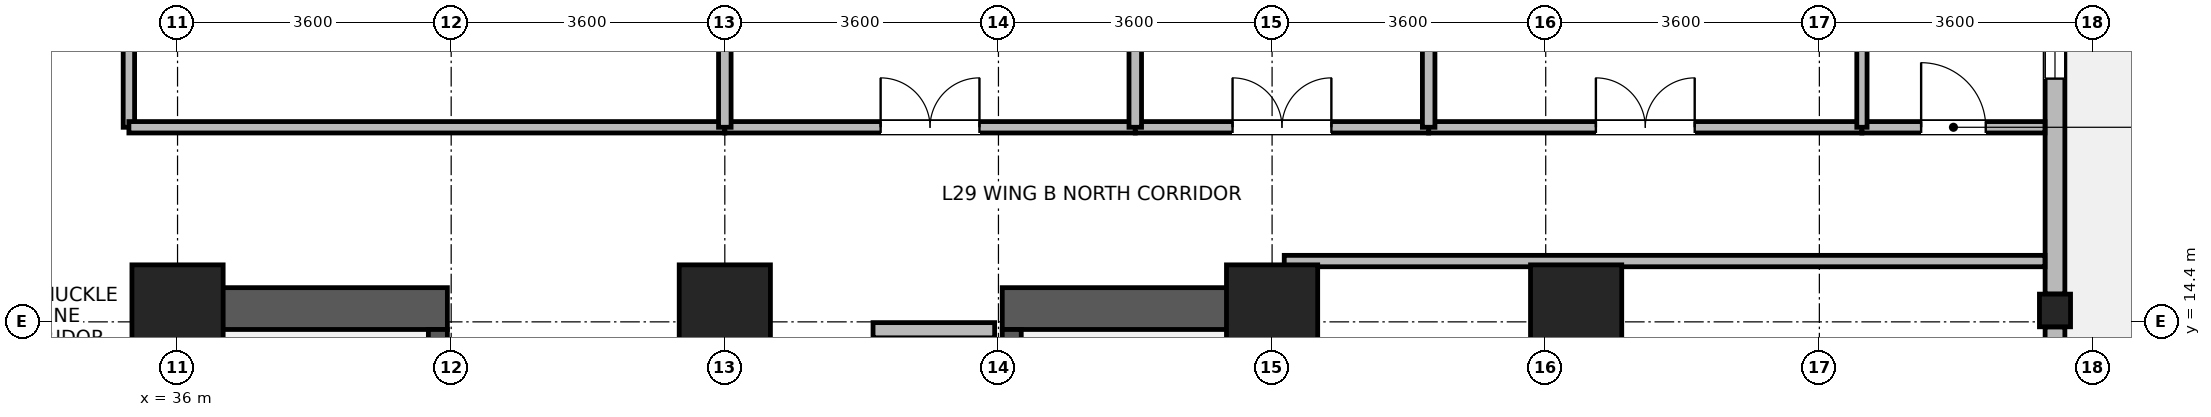
"""IFC4 building model, lengths in metres.
Left out: names, types, materials, properties, quantities, classifications, styles, units other than length and angle.
Written with IfcOpenShell. Run it as: python <this file> out.ifc"""

import sys

from ifc_helpers import new_model, si_unit, direction, frame, frame_2d, origin, origin_2d, place, context, subcontext, project, spatial, rectangle, i_section, extrude, source, transform, mapped, element, fill, save


model = new_model("IFC4")
c1 = context("Model", 3, precision=1e-05, world=origin(), true_north=direction((0.0, 1.0)))
c2 = subcontext(c1, "Body", "Model", "MODEL_VIEW")
j1 = project(units=[si_unit("LENGTHUNIT", "METRE"), si_unit("PLANEANGLEUNIT", "RADIAN")], contexts=[c1])
p1 = place(None, origin())
s1 = spatial("IfcSite", under=j1, at=p1, CompositionType="ELEMENT")
p2 = place(p1, origin())
s2 = spatial("IfcBuilding", under=s1, at=p2, CompositionType="ELEMENT")
p3 = place(p2, frame((0.0, 0.0, 115.6)))
s3 = spatial("IfcBuildingStorey", under=s2, at=p3, CompositionType="ELEMENT", Elevation=115.6)
for number, where, z_axis, x_axis in (
    (1, (36.075, 6.75, 0.0), (0.0, 0.0, 1.0), (0.0, 1.0, 0.0)),
    (2, (50.325, 6.75, 0.0), (0.0, 0.0, 1.0), (0.0, 1.0, 0.0)),
):
    element("IfcWall", number, at=place(p3, frame(where, z_axis=z_axis, x_axis=x_axis)), inside=s3, PredefinedType="SHEAR", context=c2, shape_type="SweptSolid", body=[
        extrude(rectangle(XDim=8.1, YDim=0.55, at=frame_2d((4.05, 0.0))), origin(), (0.0, 0.0, 1.0), 3.45),
    ])
for number, where, z_axis, x_axis in (
    (3, (36.35, 14.575, 0.0), (0.0, 0.0, 1.0), (1.0, 0.0, 0.0)),
    (4, (46.85, 14.575, 0.0), (0.0, 0.0, 1.0), (1.0, 0.0, 0.0)),
):
    element("IfcWall", number, at=place(p3, frame(where, z_axis=z_axis, x_axis=x_axis)), inside=s3, PredefinedType="SHEAR", context=c2, shape_type="SweptSolid", body=[
        extrude(rectangle(XDim=3.2, YDim=0.55, at=frame_2d((1.6, 0.0))), origin(), (0.0, 0.0, 1.0), 3.45),
    ])
p4 = place(p3, frame((39.425, 7.3, 0.0), z_axis=(0.0, 0.0, 1.0), x_axis=(0.0, 1.0, 0.0)))
e5 = element("IfcWall", 5, at=p4, inside=s3, PredefinedType="SHEAR", context=c2, shape_type="SweptSolid", body=[
    extrude(rectangle(XDim=7.0, YDim=0.25, at=frame_2d((3.5, 0.0))), origin(), (0.0, 0.0, 1.0), 3.45),
])
p5 = place(p4, frame((0.15, 0.0, 0.0)))
e6 = element("IfcOpeningElement", 6, at=p5, cuts=e5, PredefinedType="OPENING", context=c2, shape_type="SweptSolid", body=[
    extrude(rectangle(XDim=1.1, YDim=2.08, at=frame_2d((0.55, 1.04))), frame((0.0, 0.135, 0.0), z_axis=(0.0, -1.0, 0.0), x_axis=(1.0, 0.0, 0.0)), (0.0, 0.0, 1.0), 0.27),
])
p6 = place(p3, frame((46.975, 7.3, 0.0), z_axis=(0.0, 0.0, 1.0), x_axis=(0.0, 1.0, 0.0)))
e7 = element("IfcWall", 7, at=p6, inside=s3, PredefinedType="SHEAR", context=c2, shape_type="SweptSolid", body=[
    extrude(rectangle(XDim=7.0, YDim=0.25, at=frame_2d((3.5, 0.0))), origin(), (0.0, 0.0, 1.0), 3.45),
])
p7 = place(p6, frame((0.15, 0.0, 0.0)))
e8 = element("IfcOpeningElement", 8, at=p7, cuts=e7, PredefinedType="OPENING", context=c2, shape_type="SweptSolid", body=[
    extrude(rectangle(XDim=1.1, YDim=2.08, at=frame_2d((0.55, 1.04))), frame((0.0, 0.135, 0.0), z_axis=(0.0, -1.0, 0.0), x_axis=(1.0, 0.0, 0.0)), (0.0, 0.0, 1.0), 0.27),
])
m1 = source(origin(), c2, "Body", "SweptSolid", [
    extrude(rectangle(XDim=1.2, YDim=1.2, at=origin_2d()), origin(), (0.0, 0.0, 1.0), 3.7),
])
for number, where, z_axis, x_axis in (
    (9, (36.0, 14.55, 0.0), (0.0, 0.0, 1.0), (1.0, 0.0, 0.0)),
    (10, (43.2, 14.55, 0.0), (0.0, 0.0, 1.0), (1.0, 0.0, 0.0)),
    (11, (50.4, 14.55, 0.0), (0.0, 0.0, 1.0), (1.0, 0.0, 0.0)),
    (12, (54.4, 14.55, 0.0), (0.0, 0.0, 1.0), (1.0, 0.0, 0.0)),
):
    element("IfcColumn", number, at=place(p3, frame(where, z_axis=z_axis, x_axis=x_axis)), inside=s3, PredefinedType="COLUMN", context=c2, shape_type="MappedRepresentation", body=[
        mapped(m1, transform((0.0, 0.0, 0.0), x_axis=(1.0, 0.0, 0.0), y_axis=(0.0, 1.0, 0.0), z_axis=(0.0, 0.0, 1.0), scale=1.0)),
    ])
m2 = source(origin(), c2, "Body", "SweptSolid", [
    extrude(i_section(OverallWidth=0.409, OverallDepth=0.43, WebThickness=0.024, FlangeThickness=0.033, FilletRadius=0.015, at=origin_2d()), origin(), (0.0, 0.0, 1.0), 3.7),
])
p8 = place(p3, frame((60.7, 14.55, 0.0), z_axis=(0.0, 0.0, 1.0), x_axis=(1.0, 0.0, 0.0)))
e13 = element("IfcColumn", 13, at=p8, inside=s3, PredefinedType="COLUMN", context=c2, shape_type="MappedRepresentation", body=[
    mapped(m2, transform((0.0, 0.0, 0.0), x_axis=(1.0, 0.0, 0.0), y_axis=(0.0, 1.0, 0.0), z_axis=(0.0, 0.0, 1.0), scale=1.0)),
])
p9 = place(p3, frame((60.7, 14.334, 0.0), z_axis=(0.0, 0.0, 1.0), x_axis=(0.0, -1.0, 0.0)))
e14 = element("IfcWall", 14, at=p9, inside=s3, PredefinedType="STANDARD", context=c2, shape_type="SweptSolid", body=[
    extrude(rectangle(XDim=7.068, YDim=0.26, at=frame_2d((3.534, 0.0))), origin(), (0.0, 0.0, 1.0), 2.98),
])
p10 = place(p9, frame((2.784, 0.0, 0.0)))
e15 = element("IfcOpeningElement", 15, at=p10, cuts=e14, PredefinedType="OPENING", context=c2, shape_type="SweptSolid", body=[
    extrude(rectangle(XDim=1.5, YDim=2.15, at=frame_2d((0.75, 1.075))), frame((0.0, 0.14, 0.0), z_axis=(0.0, -1.0, 0.0), x_axis=(1.0, 0.0, 0.0)), (0.0, 0.0, 1.0), 0.28),
])
p11 = place(p9, frame((1.017, 0.0, 0.85)))
e16 = element("IfcOpeningElement", 16, at=p11, cuts=e14, PredefinedType="OPENING", context=c2, shape_type="SweptSolid", body=[
    extrude(rectangle(XDim=1.5, YDim=1.85, at=frame_2d((0.75, 0.925))), frame((0.0, 0.14, 0.0), z_axis=(0.0, -1.0, 0.0), x_axis=(1.0, 0.0, 0.0)), (0.0, 0.0, 1.0), 0.28),
])
p12 = place(p9, frame((4.551, 0.0, 0.85)))
e17 = element("IfcOpeningElement", 17, at=p12, cuts=e14, PredefinedType="OPENING", context=c2, shape_type="SweptSolid", body=[
    extrude(rectangle(XDim=1.5, YDim=1.85, at=frame_2d((0.75, 0.925))), frame((0.0, 0.14, 0.0), z_axis=(0.0, -1.0, 0.0), x_axis=(1.0, 0.0, 0.0)), (0.0, 0.0, 1.0), 0.28),
])
p13 = place(p3, frame((60.7, 21.384, 0.0), z_axis=(0.0, 0.0, 1.0), x_axis=(0.0, -1.0, 0.0)))
e18 = element("IfcWall", 18, at=p13, inside=s3, PredefinedType="STANDARD", context=c2, shape_type="SweptSolid", body=[
    extrude(rectangle(XDim=6.618, YDim=0.26, at=frame_2d((3.309, 0.0))), origin(), (0.0, 0.0, 1.0), 2.98),
])
p14 = place(p13, frame((0.905, 0.0, 0.85)))
e19 = element("IfcOpeningElement", 19, at=p14, cuts=e18, PredefinedType="OPENING", context=c2, shape_type="SweptSolid", body=[
    extrude(rectangle(XDim=1.5, YDim=1.85, at=frame_2d((0.75, 0.925))), frame((0.0, 0.14, 0.0), z_axis=(0.0, -1.0, 0.0), x_axis=(1.0, 0.0, 0.0)), (0.0, 0.0, 1.0), 0.28),
])
p15 = place(p13, frame((2.834, 0.0, 0.85)))
e20 = element("IfcOpeningElement", 20, at=p15, cuts=e18, PredefinedType="OPENING", context=c2, shape_type="SweptSolid", body=[
    extrude(rectangle(XDim=0.95, YDim=1.75, at=frame_2d((0.475, 0.875))), frame((0.0, 0.14, 0.0), z_axis=(0.0, -1.0, 0.0), x_axis=(1.0, 0.0, 0.0)), (0.0, 0.0, 1.0), 0.28),
])
p16 = place(p3, frame((45.15, 14.29, 0.0), z_axis=(0.0, 0.0, 1.0), x_axis=(1.0, 0.0, 0.0)))
e21 = element("IfcWall", 21, at=p16, inside=s3, PredefinedType="PARTITIONING", context=c2, shape_type="SweptSolid", body=[
    extrude(rectangle(XDim=1.6, YDim=0.2, at=frame_2d((0.8, 0.0))), origin(), (0.0, 0.0, 1.0), 2.43),
])
p17 = place(p3, frame((50.56, 15.2, 0.0), z_axis=(0.0, 0.0, 1.0), x_axis=(1.0, 0.0, 0.0)))
e22 = element("IfcWall", 22, at=p17, inside=s3, PredefinedType="PARTITIONING", context=c2, shape_type="SweptSolid", body=[
    extrude(rectangle(XDim=10.008, YDim=0.15, at=frame_2d((5.004, 0.0))), origin(), (0.0, 0.0, 1.0), 3.43),
])
p18 = place(p3, frame((35.36, 16.96, 0.0), z_axis=(0.0, 0.0, 1.0), x_axis=(0.0, 1.0, 0.0)))
e23 = element("IfcWall", 23, at=p18, inside=s3, PredefinedType="PARTITIONING", context=c2, shape_type="SweptSolid", body=[
    extrude(rectangle(XDim=9.8, YDim=0.15, at=frame_2d((4.9, 0.0))), origin(), (0.0, 0.0, 1.0), 3.43),
])
p19 = place(p18, frame((2.486, 0.0, 0.0)))
e24 = element("IfcOpeningElement", 24, at=p19, cuts=e23, PredefinedType="OPENING", context=c2, shape_type="SweptSolid", body=[
    extrude(rectangle(XDim=1.3, YDim=2.12, at=frame_2d((0.65, 1.06))), frame((0.0, 0.085, 0.0), z_axis=(0.0, -1.0, 0.0), x_axis=(1.0, 0.0, 0.0)), (0.0, 0.0, 1.0), 0.17),
])
p20 = place(p3, frame((35.36, 16.96, 0.0), z_axis=(0.0, 0.0, 1.0), x_axis=(1.0, 0.0, 0.0)))
e25 = element("IfcWall", 25, at=p20, inside=s3, PredefinedType="PARTITIONING", context=c2, shape_type="SweptSolid", body=[
    extrude(rectangle(XDim=7.84, YDim=0.15, at=frame_2d((3.92, 0.0))), origin(), (0.0, 0.0, 1.0), 3.43),
])
p21 = place(p3, frame((52.46, 16.96, 0.0), z_axis=(0.0, 0.0, 1.0), x_axis=(1.0, 0.0, 0.0)))
e26 = element("IfcWall", 26, at=p21, inside=s3, PredefinedType="PARTITIONING", context=c2, shape_type="SweptSolid", body=[
    extrude(rectangle(XDim=5.7, YDim=0.15, at=frame_2d((2.85, 0.0))), origin(), (0.0, 0.0, 1.0), 3.43),
])
p22 = place(p21, frame((2.2, 0.0, 0.0)))
e27 = element("IfcOpeningElement", 27, at=p22, cuts=e26, PredefinedType="OPENING", context=c2, shape_type="SweptSolid", body=[
    extrude(rectangle(XDim=1.3, YDim=2.12, at=frame_2d((0.65, 1.06))), frame((0.0, 0.085, 0.0), z_axis=(0.0, -1.0, 0.0), x_axis=(1.0, 0.0, 0.0)), (0.0, 0.0, 1.0), 0.17),
])
p23 = place(p3, frame((43.2, 16.96, 0.0), z_axis=(0.0, 0.0, 1.0), x_axis=(1.0, 0.0, 0.0)))
e28 = element("IfcWall", 28, at=p23, inside=s3, PredefinedType="PARTITIONING", context=c2, shape_type="SweptSolid", body=[
    extrude(rectangle(XDim=5.4, YDim=0.15, at=frame_2d((2.7, 0.0))), origin(), (0.0, 0.0, 1.0), 3.43),
])
p24 = place(p23, frame((2.05, 0.0, 0.0)))
e29 = element("IfcOpeningElement", 29, at=p24, cuts=e28, PredefinedType="OPENING", context=c2, shape_type="SweptSolid", body=[
    extrude(rectangle(XDim=1.3, YDim=2.12, at=frame_2d((0.65, 1.06))), frame((0.0, 0.085, 0.0), z_axis=(0.0, -1.0, 0.0), x_axis=(1.0, 0.0, 0.0)), (0.0, 0.0, 1.0), 0.17),
])
p25 = place(p3, frame((48.6, 16.96, 0.0), z_axis=(0.0, 0.0, 1.0), x_axis=(1.0, 0.0, 0.0)))
e30 = element("IfcWall", 30, at=p25, inside=s3, PredefinedType="PARTITIONING", context=c2, shape_type="SweptSolid", body=[
    extrude(rectangle(XDim=3.86, YDim=0.15, at=frame_2d((1.93, 0.0))), origin(), (0.0, 0.0, 1.0), 3.43),
])
p26 = place(p25, frame((1.28, 0.0, 0.0)))
e31 = element("IfcOpeningElement", 31, at=p26, cuts=e30, PredefinedType="OPENING", context=c2, shape_type="SweptSolid", body=[
    extrude(rectangle(XDim=1.3, YDim=2.12, at=frame_2d((0.65, 1.06))), frame((0.0, 0.085, 0.0), z_axis=(0.0, -1.0, 0.0), x_axis=(1.0, 0.0, 0.0)), (0.0, 0.0, 1.0), 0.17),
])
p27 = place(p3, frame((58.16, 16.96, 0.0), z_axis=(0.0, 0.0, 1.0), x_axis=(1.0, 0.0, 0.0)))
e32 = element("IfcWall", 32, at=p27, inside=s3, PredefinedType="PARTITIONING", context=c2, shape_type="SweptSolid", body=[
    extrude(rectangle(XDim=2.408, YDim=0.15, at=frame_2d((1.204, 0.0))), origin(), (0.0, 0.0, 1.0), 3.43),
])
p28 = place(p27, frame((0.779, 0.0, 0.0)))
e33 = element("IfcOpeningElement", 33, at=p28, cuts=e32, PredefinedType="OPENING", context=c2, shape_type="SweptSolid", body=[
    extrude(rectangle(XDim=0.85, YDim=2.04, at=frame_2d((0.425, 1.02))), frame((0.0, 0.085, 0.0), z_axis=(0.0, -1.0, 0.0), x_axis=(1.0, 0.0, 0.0)), (0.0, 0.0, 1.0), 0.17),
])
for number, where, z_axis, x_axis in (
    (34, (43.2, 16.96, 0.0), (0.0, 0.0, 1.0), (0.0, 1.0, 0.0)),
    (35, (48.6, 16.96, 0.0), (0.0, 0.0, 1.0), (0.0, 1.0, 0.0)),
    (36, (52.46, 16.96, 0.0), (0.0, 0.0, 1.0), (0.0, 1.0, 0.0)),
):
    element("IfcWall", number, at=place(p3, frame(where, z_axis=z_axis, x_axis=x_axis)), inside=s3, PredefinedType="PARTITIONING", context=c2, shape_type="SweptSolid", body=[
        extrude(rectangle(XDim=9.8, YDim=0.165, at=frame_2d((4.9, 0.0))), origin(), (0.0, 0.0, 1.0), 3.43),
    ])
p29 = place(p3, frame((58.16, 16.96, 0.0), z_axis=(0.0, 0.0, 1.0), x_axis=(0.0, 1.0, 0.0)))
e37 = element("IfcWall", 37, at=p29, inside=s3, PredefinedType="PARTITIONING", context=c2, shape_type="SweptSolid", body=[
    extrude(rectangle(XDim=9.8, YDim=0.135, at=frame_2d((4.9, 0.0))), origin(), (0.0, 0.0, 1.0), 3.43),
])
p30 = place(p15, origin())
e38 = element("IfcWindow", 38, at=p30, inside=s3, PartitioningType="SINGLE_PANEL", PredefinedType="WINDOW", context=c2, shape_type="SweptSolid", body=[
    extrude(rectangle(XDim=0.95, YDim=1.75, at=frame_2d((0.475, 0.875))), frame((0.0, 0.03, 0.0), z_axis=(0.0, -1.0, 0.0), x_axis=(1.0, 0.0, 0.0)), (0.0, 0.0, 1.0), 0.06),
])
fill(e20, e38)
p31 = place(p22, origin())
e39 = element("IfcDoor", 39, at=p31, inside=s3, OperationType="DOUBLE_DOOR_SINGLE_SWING", PredefinedType="DOOR", context=c2, shape_type="SweptSolid", body=[
    extrude(rectangle(XDim=1.3, YDim=2.12, at=frame_2d((0.65, 1.06))), frame((0.0, 0.025, 0.0), z_axis=(0.0, -1.0, 0.0), x_axis=(1.0, 0.0, 0.0)), (0.0, 0.0, 1.0), 0.05),
])
fill(e27, e39)
p32 = place(p24, origin())
e40 = element("IfcDoor", 40, at=p32, inside=s3, OperationType="DOUBLE_DOOR_SINGLE_SWING", PredefinedType="DOOR", context=c2, shape_type="SweptSolid", body=[
    extrude(rectangle(XDim=1.3, YDim=2.12, at=frame_2d((0.65, 1.06))), frame((0.0, 0.025, 0.0), z_axis=(0.0, -1.0, 0.0), x_axis=(1.0, 0.0, 0.0)), (0.0, 0.0, 1.0), 0.05),
])
fill(e29, e40)
p33 = place(p26, origin())
e41 = element("IfcDoor", 41, at=p33, inside=s3, OperationType="DOUBLE_DOOR_SINGLE_SWING", PredefinedType="DOOR", context=c2, shape_type="SweptSolid", body=[
    extrude(rectangle(XDim=1.3, YDim=2.12, at=frame_2d((0.65, 1.06))), frame((0.0, 0.025, 0.0), z_axis=(0.0, -1.0, 0.0), x_axis=(1.0, 0.0, 0.0)), (0.0, 0.0, 1.0), 0.05),
])
fill(e31, e41)
p34 = place(p28, origin())
e42 = element("IfcDoor", 42, at=p34, inside=s3, OperationType="SINGLE_SWING_LEFT", PredefinedType="DOOR", context=c2, shape_type="SweptSolid", body=[
    extrude(rectangle(XDim=0.85, YDim=2.04, at=frame_2d((0.425, 1.02))), frame((0.0, 0.025, 0.0), z_axis=(0.0, -1.0, 0.0), x_axis=(1.0, 0.0, 0.0)), (0.0, 0.0, 1.0), 0.05),
])
fill(e33, e42)
save(model, sys.argv[1])
